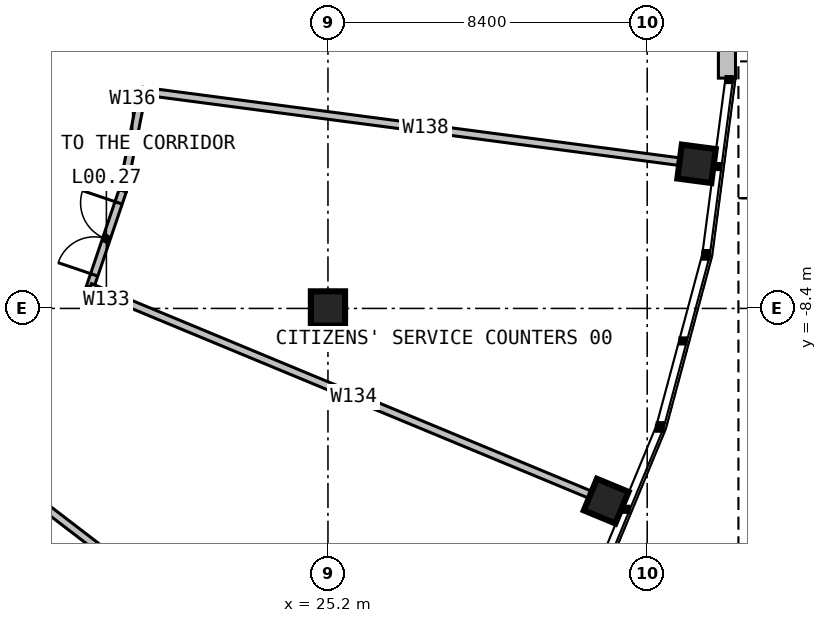
"""IFC4 building model, lengths in metres.
Left out: names, types, materials, properties, quantities, classifications, styles, units other than length and angle.
Written with IfcOpenShell. Run it as: python <this file> out.ifc"""

import sys

from ifc_helpers import new_model, si_unit, direction, frame, frame_2d, origin, origin_2d, place, context, subcontext, project, spatial, rectangle, extrude, element, fill, save


model = new_model("IFC4")
c1 = context("Model", 3, precision=1e-05, world=origin(), true_north=direction((0.0, 1.0)))
c2 = subcontext(c1, "Body", "Model", "MODEL_VIEW")
j1 = project(units=[si_unit("LENGTHUNIT", "METRE"), si_unit("PLANEANGLEUNIT", "RADIAN")], contexts=[c1])
p1 = place(None, origin())
s1 = spatial("IfcSite", under=j1, at=p1, CompositionType="ELEMENT")
p2 = place(p1, origin())
s2 = spatial("IfcBuilding", under=s1, at=p2, CompositionType="ELEMENT")
p3 = place(p2, origin())
s3 = spatial("IfcBuildingStorey", under=s2, at=p3, CompositionType="ELEMENT", Elevation=0.0)
for number, where, z_axis, x_axis in (
    (1, (25.2, -8.4, 0.0), (0.0, 0.0, 1.0), (1.0, 0.0, 0.0)),
    (2, (32.521, -13.47, 0.0), (0.0, 0.0, 1.0), (0.924, -0.383, 0.0)),
    (3, (34.899, -4.594, 0.0), (0.0, 0.0, 1.0), (0.991, -0.131, 0.0)),
):
    element("IfcColumn", number, at=place(p3, frame(where, z_axis=z_axis, x_axis=x_axis)), inside=s3, PredefinedType="COLUMN", context=c2, shape_type="SweptSolid", body=[
        extrude(rectangle(XDim=0.9, YDim=0.9, at=origin_2d()), origin(), (0.0, 0.0, 1.0), 6.0),
    ])
p4 = place(p3, frame((35.698, -2.34, 0.0), z_axis=(0.0, 0.0, 1.0), x_axis=(0.0, 1.0, 0.0)))
e4 = element("IfcWall", 4, at=p4, inside=s3, PredefinedType="SOLIDWALL", context=c2, shape_type="SweptSolid", body=[
    extrude(rectangle(XDim=4.68, YDim=0.45, at=frame_2d((2.34, 0.0))), origin(), (0.0, 0.0, 1.0), 5.7),
])
p5 = place(p4, frame((1.34, 0.0, 0.0)))
e5 = element("IfcOpeningElement", 5, at=p5, cuts=e4, PredefinedType="OPENING", context=c2, shape_type="SweptSolid", body=[
    extrude(rectangle(XDim=2.0, YDim=3.0, at=frame_2d((1.0, 1.5))), frame((0.0, 0.235, 0.0), z_axis=(0.0, -1.0, 0.0), x_axis=(1.0, 0.0, 0.0)), (0.0, 0.0, 1.0), 0.47),
])
p6 = place(p3, frame((16.26, -12.48, 0.0), z_axis=(0.0, 0.0, 1.0), x_axis=(0.79355952344, -0.608492631637, 0.0)))
e6 = element("IfcWall", 6, at=p6, inside=s3, PredefinedType="PARTITIONING", context=c2, shape_type="SweptSolid", body=[
    extrude(rectangle(XDim=14.431, YDim=0.2, at=frame_2d((7.215, 0.0))), origin(), (0.0, 0.0, 1.0), 5.7),
])
p7 = place(p3, frame((18.94, -7.84, 0.0), z_axis=(0.0, 0.0, 1.0), x_axis=(0.320730632057, 0.947170450162, 0.0)))
e7 = element("IfcWall", 7, at=p7, inside=s3, PredefinedType="PARTITIONING", context=c2, shape_type="SweptSolid", body=[
    extrude(rectangle(XDim=2.682, YDim=0.2, at=frame_2d((1.341, 0.0))), origin(), (0.0, 0.0, 1.0), 5.7),
])
p8 = place(p7, frame((0.341, 0.0, 0.0)))
e8 = element("IfcOpeningElement", 8, at=p8, cuts=e7, PredefinedType="OPENING", context=c2, shape_type="SweptSolid", body=[
    extrude(rectangle(XDim=2.0, YDim=2.4, at=frame_2d((1.0, 1.2))), frame((0.0, 0.11, 0.0), z_axis=(0.0, -1.0, 0.0), x_axis=(1.0, 0.0, 0.0)), (0.0, 0.0, 1.0), 0.22),
])
p9 = place(p3, frame((18.94, -7.84, 0.0), z_axis=(0.0, 0.0, 1.0), x_axis=(0.923628236009, -0.383289553272, 0.0)))
e9 = element("IfcWall", 9, at=p9, inside=s3, PredefinedType="PARTITIONING", context=c2, shape_type="SweptSolid", body=[
    extrude(rectangle(XDim=15.028, YDim=0.2, at=frame_2d((7.514, 0.0))), origin(), (0.0, 0.0, 1.0), 5.7),
])
p10 = place(p3, frame((19.8, -5.3, 0.0), z_axis=(0.0, 0.0, 1.0), x_axis=(0.194674669879, 0.980867867201, 0.0)))
e10 = element("IfcWall", 10, at=p10, inside=s3, PredefinedType="PARTITIONING", context=c2, shape_type="SweptSolid", body=[
    extrude(rectangle(XDim=2.671, YDim=0.2, at=frame_2d((1.335, 0.0))), origin(), (0.0, 0.0, 1.0), 5.7),
])
p11 = place(p3, frame((20.32, -2.68, 0.0), z_axis=(0.0, 0.0, 1.0), x_axis=(0.991459050186, -0.130418372192, 0.0)))
e11 = element("IfcWall", 11, at=p11, inside=s3, PredefinedType="PARTITIONING", context=c2, shape_type="SweptSolid", body=[
    extrude(rectangle(XDim=15.028, YDim=0.2, at=frame_2d((7.514, 0.0))), origin(), (0.0, 0.0, 1.0), 5.7),
])
p12 = place(p8, origin())
e12 = element("IfcDoor", 12, at=p12, inside=s3, OperationType="DOUBLE_DOOR_SINGLE_SWING", PredefinedType="DOOR", context=c2, shape_type="SweptSolid", body=[
    extrude(rectangle(XDim=2.0, YDim=2.4, at=frame_2d((1.0, 1.2))), frame((0.0, 0.025, 0.0), z_axis=(0.0, -1.0, 0.0), x_axis=(1.0, 0.0, 0.0)), (0.0, 0.0, 1.0), 0.05),
])
fill(e8, e12)
save(model, sys.argv[1])
